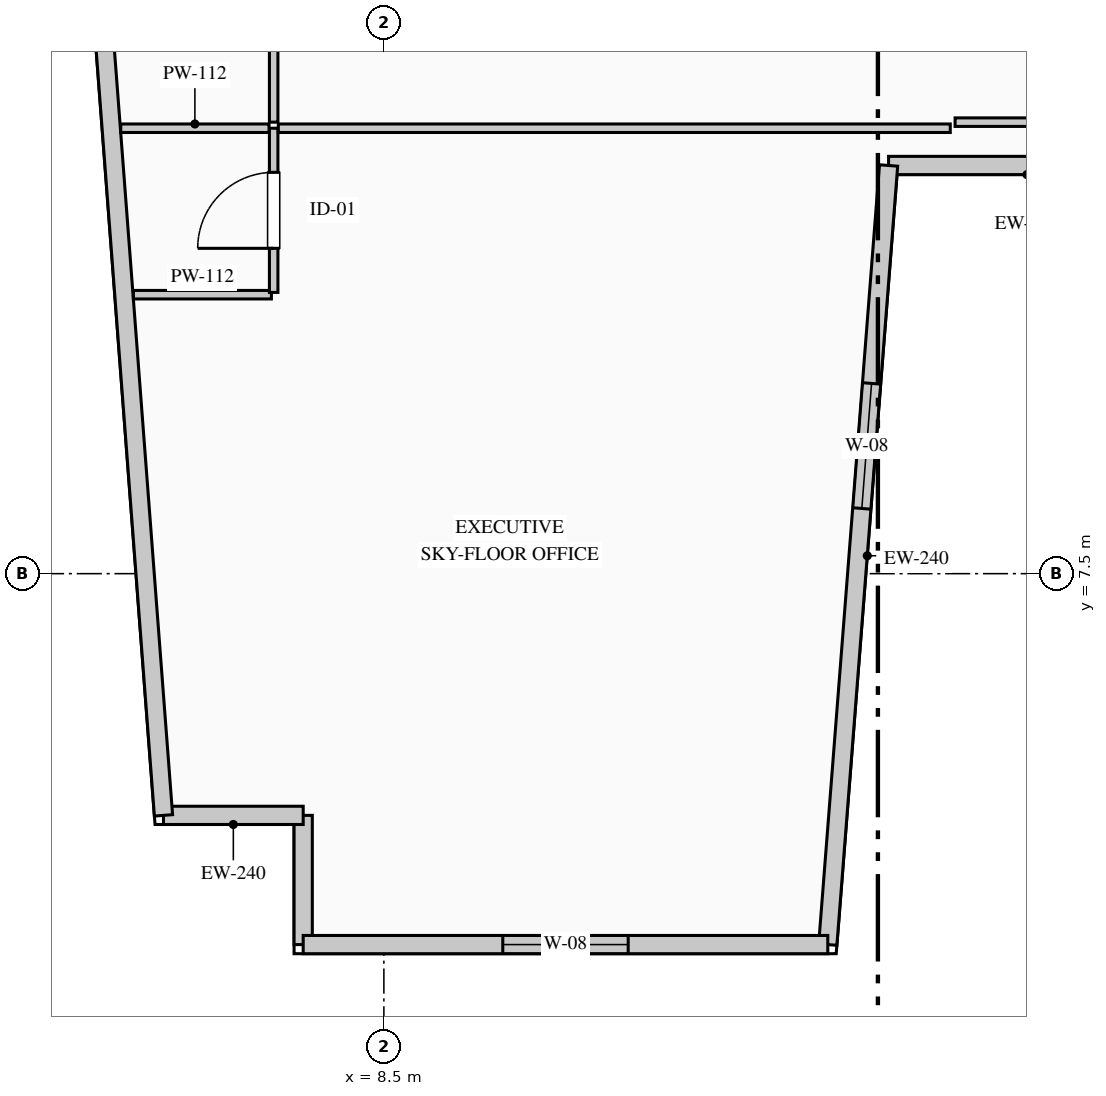
"""IFC4 building model, lengths in metres.
Left out: names, types, materials, properties, quantities, classifications, styles, units other than length and angle.
Written with IfcOpenShell. Run it as: python <this file> out.ifc"""

import sys

from ifc_helpers import new_model, si_unit, direction, frame, frame_2d, origin, place, context, subcontext, project, spatial, rectangle, extrude, element, fill, save


model = new_model("IFC4")
c1 = context("Model", 3, precision=1e-05, world=origin(), true_north=direction((0.0, 1.0)))
c2 = subcontext(c1, "Body", "Model", "MODEL_VIEW")
j1 = project(units=[si_unit("LENGTHUNIT", "METRE"), si_unit("PLANEANGLEUNIT", "RADIAN")], contexts=[c1])
p1 = place(None, origin())
s1 = spatial("IfcSite", under=j1, at=p1, CompositionType="ELEMENT")
p2 = place(p1, origin())
s2 = spatial("IfcBuilding", under=s1, at=p2, CompositionType="ELEMENT")
p3 = place(p2, frame((0.0, 0.0, 284.35)))
s3 = spatial("IfcBuildingStorey", under=s2, at=p3, CompositionType="ELEMENT", Elevation=284.35)
p4 = place(p3, frame((7.438, 2.62, 0.0), z_axis=(0.0, 0.0, 1.0), x_axis=(0.0, 1.0, 0.0)))
e1 = element("IfcWall", 1, at=p4, inside=s3, PredefinedType="STANDARD", context=c2, shape_type="SweptSolid", body=[
    extrude(rectangle(XDim=1.7, YDim=0.24, at=frame_2d((0.85, 0.0))), origin(), (0.0, 0.0, 1.0), 3.7),
])
p5 = place(p3, frame((7.438, 4.32, 0.0), z_axis=(0.0, 0.0, 1.0), x_axis=(-1.0, 0.0, 0.0)))
e2 = element("IfcWall", 2, at=p5, inside=s3, PredefinedType="STANDARD", context=c2, shape_type="SweptSolid", body=[
    extrude(rectangle(XDim=1.838, YDim=0.24, at=frame_2d((0.919, 0.0))), origin(), (0.0, 0.0, 1.0), 3.7),
])
p6 = place(p3, frame((5.6, 4.32, 0.0), z_axis=(0.0, 0.0, 1.0), x_axis=(-0.075839920993, 0.997120006009, 0.0)))
e3 = element("IfcWall", 3, at=p6, inside=s3, PredefinedType="STANDARD", context=c2, shape_type="SweptSolid", body=[
    extrude(rectangle(XDim=37.468, YDim=0.24, at=frame_2d((18.734, 0.0))), origin(), (0.0, 0.0, 1.0), 3.7),
])
p7 = place(p6, frame((12.663, 0.0, 0.9)))
e4 = element("IfcOpeningElement", 4, at=p7, cuts=e3, PredefinedType="OPENING", context=c2, shape_type="SweptSolid", body=[
    extrude(rectangle(XDim=1.65, YDim=1.95, at=frame_2d((0.825, 0.975))), frame((0.0, 0.13, 0.0), z_axis=(0.0, -1.0, 0.0), x_axis=(1.0, 0.0, 0.0)), (0.0, 0.0, 1.0), 0.26),
])
p8 = place(p3, frame((18.781, 12.87, 0.0), z_axis=(0.0, 0.0, 1.0), x_axis=(-1.0, 0.0, 0.0)))
e5 = element("IfcWall", 5, at=p8, inside=s3, PredefinedType="STANDARD", context=c2, shape_type="SweptSolid", body=[
    extrude(rectangle(XDim=3.641, YDim=0.24, at=frame_2d((1.82, 0.0))), origin(), (0.0, 0.0, 1.0), 3.7),
])
p9 = place(p3, frame((15.14, 12.87, 0.0), z_axis=(0.0, 0.0, 1.0), x_axis=(-0.077793257511, -0.996969512616, 0.0)))
e6 = element("IfcWall", 6, at=p9, inside=s3, PredefinedType="STANDARD", context=c2, shape_type="SweptSolid", body=[
    extrude(rectangle(XDim=10.281, YDim=0.24, at=frame_2d((5.141, 0.0))), origin(), (0.0, 0.0, 1.0), 3.7),
])
p10 = place(p9, frame((2.876, 0.0, 0.9)))
e7 = element("IfcOpeningElement", 7, at=p10, cuts=e6, PredefinedType="OPENING", context=c2, shape_type="SweptSolid", body=[
    extrude(rectangle(XDim=1.65, YDim=1.95, at=frame_2d((0.825, 0.975))), frame((0.0, 0.13, 0.0), z_axis=(0.0, -1.0, 0.0), x_axis=(1.0, 0.0, 0.0)), (0.0, 0.0, 1.0), 0.26),
])
p11 = place(p3, frame((14.341, 2.62, 0.0), z_axis=(0.0, 0.0, 1.0), x_axis=(-1.0, 0.0, 0.0)))
e8 = element("IfcWall", 8, at=p11, inside=s3, PredefinedType="STANDARD", context=c2, shape_type="SweptSolid", body=[
    extrude(rectangle(XDim=6.902, YDim=0.24, at=frame_2d((3.451, 0.0))), origin(), (0.0, 0.0, 1.0), 3.7),
])
p12 = place(p11, frame((2.626, 0.0, 0.9)))
e9 = element("IfcOpeningElement", 9, at=p12, cuts=e8, PredefinedType="OPENING", context=c2, shape_type="SweptSolid", body=[
    extrude(rectangle(XDim=1.65, YDim=1.95, at=frame_2d((0.825, 0.975))), frame((0.0, 0.13, 0.0), z_axis=(0.0, -1.0, 0.0), x_axis=(1.0, 0.0, 0.0)), (0.0, 0.0, 1.0), 0.26),
])
p13 = place(p3, frame((5.205, 11.17, 0.0), z_axis=(0.0, 0.0, 1.0), x_axis=(1.0, 0.0, 0.0)))
e10 = element("IfcWall", 10, at=p13, inside=s3, PredefinedType="PARTITIONING", context=c2, shape_type="SweptSolid", body=[
    extrude(rectangle(XDim=1.815, YDim=0.112, at=frame_2d((0.908, 0.0))), origin(), (0.0, 0.0, 1.0), 3.7),
])
p14 = place(p3, frame((7.05, 11.2, 0.0), z_axis=(0.0, 0.0, 1.0), x_axis=(0.0, 1.0, 0.0)))
e11 = element("IfcWall", 11, at=p14, inside=s3, PredefinedType="PARTITIONING", context=c2, shape_type="SweptSolid", body=[
    extrude(rectangle(XDim=2.16, YDim=0.112, at=frame_2d((1.08, 0.0))), origin(), (0.0, 0.0, 1.0), 3.7),
])
p15 = place(p14, frame((0.58, 0.0, 0.0)))
e12 = element("IfcOpeningElement", 12, at=p15, cuts=e11, PredefinedType="OPENING", context=c2, shape_type="SweptSolid", body=[
    extrude(rectangle(XDim=1.0, YDim=2.15, at=frame_2d((0.5, 1.075))), frame((0.0, 0.066, 0.0), z_axis=(0.0, -1.0, 0.0), x_axis=(1.0, 0.0, 0.0)), (0.0, 0.0, 1.0), 0.132),
])
p16 = place(p3, frame((5.038, 13.36, 0.0), z_axis=(0.0, 0.0, 1.0), x_axis=(1.0, 0.0, 0.0)))
e13 = element("IfcWall", 13, at=p16, inside=s3, PredefinedType="PARTITIONING", context=c2, shape_type="SweptSolid", body=[
    extrude(rectangle(XDim=1.951, YDim=0.112, at=frame_2d((0.976, 0.0))), origin(), (0.0, 0.0, 1.0), 3.7),
])
p17 = place(p3, frame((7.111, 13.36, 0.0), z_axis=(0.0, 0.0, 1.0), x_axis=(1.0, 0.0, 0.0)))
e14 = element("IfcWall", 14, at=p17, inside=s3, PredefinedType="PARTITIONING", context=c2, shape_type="SweptSolid", body=[
    extrude(rectangle(XDim=8.841, YDim=0.112, at=frame_2d((4.42, 0.0))), origin(), (0.0, 0.0, 1.0), 3.7),
])
p18 = place(p3, frame((18.489, 13.44, 0.0), z_axis=(0.0, 0.0, 1.0), x_axis=(-1.0, 0.0, 0.0)))
e15 = element("IfcWall", 15, at=p18, inside=s3, PredefinedType="PARTITIONING", context=c2, shape_type="SweptSolid", body=[
    extrude(rectangle(XDim=2.474, YDim=0.112, at=frame_2d((1.237, 0.0))), origin(), (0.0, 0.0, 1.0), 3.7),
])
p19 = place(p3, frame((7.05, 13.44, 0.0), z_axis=(0.0, 0.0, 1.0), x_axis=(0.0, 1.0, 0.0)))
e16 = element("IfcWall", 16, at=p19, inside=s3, PredefinedType="PARTITIONING", context=c2, shape_type="SweptSolid", body=[
    extrude(rectangle(XDim=15.88, YDim=0.112, at=frame_2d((7.94, 0.0))), origin(), (0.0, 0.0, 1.0), 3.7),
])
p20 = place(p19, frame((7.44, 0.0, 0.0)))
e17 = element("IfcOpeningElement", 17, at=p20, cuts=e16, PredefinedType="OPENING", context=c2, shape_type="SweptSolid", body=[
    extrude(rectangle(XDim=1.0, YDim=2.15, at=frame_2d((0.5, 1.075))), frame((0.0, 0.066, 0.0), z_axis=(0.0, -1.0, 0.0), x_axis=(1.0, 0.0, 0.0)), (0.0, 0.0, 1.0), 0.132),
])
p21 = place(p10, origin())
e18 = element("IfcWindow", 18, at=p21, inside=s3, PartitioningType="SINGLE_PANEL", PredefinedType="WINDOW", context=c2, shape_type="SweptSolid", body=[
    extrude(rectangle(XDim=1.65, YDim=1.95, at=frame_2d((0.825, 0.975))), frame((0.0, 0.03, 0.0), z_axis=(0.0, -1.0, 0.0), x_axis=(1.0, 0.0, 0.0)), (0.0, 0.0, 1.0), 0.06),
])
fill(e7, e18)
p22 = place(p12, origin())
e19 = element("IfcWindow", 19, at=p22, inside=s3, PartitioningType="SINGLE_PANEL", PredefinedType="WINDOW", context=c2, shape_type="SweptSolid", body=[
    extrude(rectangle(XDim=1.65, YDim=1.95, at=frame_2d((0.825, 0.975))), frame((0.0, 0.03, 0.0), z_axis=(0.0, -1.0, 0.0), x_axis=(1.0, 0.0, 0.0)), (0.0, 0.0, 1.0), 0.06),
])
fill(e9, e19)
p23 = place(p15, origin())
e20 = element("IfcDoor", 20, at=p23, inside=s3, OperationType="SINGLE_SWING_LEFT", PredefinedType="DOOR", context=c2, shape_type="SweptSolid", body=[
    extrude(rectangle(XDim=1.0, YDim=2.15, at=frame_2d((0.5, 1.075))), frame((0.0, 0.025, 0.0), z_axis=(0.0, -1.0, 0.0), x_axis=(1.0, 0.0, 0.0)), (0.0, 0.0, 1.0), 0.05),
])
fill(e12, e20)
save(model, sys.argv[1])
